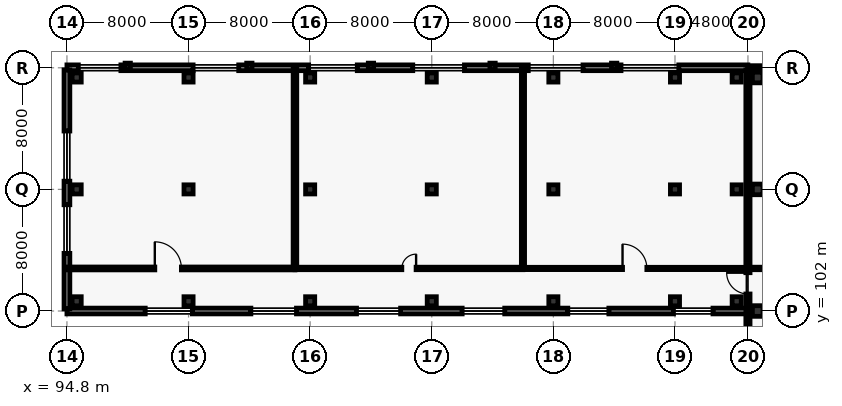
"""IFC4 building model, lengths in metres.
Left out: names, types, materials, properties, quantities, classifications, styles, units other than length and angle.
Written with IfcOpenShell. Run it as: python <this file> out.ifc"""

import sys

from ifc_helpers import new_model, si_unit, direction, frame, frame_2d, origin, origin_2d, place, context, subcontext, project, spatial, rectangle, extrude, element, fill, save


model = new_model("IFC4")
c1 = context("Model", 3, precision=1e-05, world=origin(), true_north=direction((0.0, 1.0)))
c2 = subcontext(c1, "Body", "Model", "MODEL_VIEW")
j1 = project(units=[si_unit("LENGTHUNIT", "METRE"), si_unit("PLANEANGLEUNIT", "RADIAN")], contexts=[c1])
p1 = place(None, origin())
s1 = spatial("IfcSite", under=j1, at=p1, CompositionType="ELEMENT")
p2 = place(p1, origin())
s2 = spatial("IfcBuilding", under=s1, at=p2, CompositionType="ELEMENT")
p3 = place(p2, frame((0.0, 0.0, 5.4)))
s3 = spatial("IfcBuildingStorey", under=s2, at=p3, CompositionType="ELEMENT", Elevation=5.4)
for number, where, z_axis, x_axis in (
    (1, (95.44, 102.64, 0.0), (0.0, 0.0, 1.0), (1.0, 0.0, 0.0)),
    (2, (95.44, 110.0, 0.0), (0.0, 0.0, 1.0), (1.0, 0.0, 0.0)),
    (3, (95.44, 117.36, 0.0), (0.0, 0.0, 1.0), (1.0, 0.0, 0.0)),
    (4, (102.8, 102.64, 0.0), (0.0, 0.0, 1.0), (1.0, 0.0, 0.0)),
    (5, (102.8, 110.0, 0.0), (0.0, 0.0, 1.0), (1.0, 0.0, 0.0)),
    (6, (102.8, 117.36, 0.0), (0.0, 0.0, 1.0), (1.0, 0.0, 0.0)),
    (7, (110.8, 102.64, 0.0), (0.0, 0.0, 1.0), (1.0, 0.0, 0.0)),
    (8, (110.8, 110.0, 0.0), (0.0, 0.0, 1.0), (1.0, 0.0, 0.0)),
    (9, (110.8, 117.36, 0.0), (0.0, 0.0, 1.0), (1.0, 0.0, 0.0)),
    (10, (118.8, 102.64, 0.0), (0.0, 0.0, 1.0), (1.0, 0.0, 0.0)),
    (11, (118.8, 110.0, 0.0), (0.0, 0.0, 1.0), (1.0, 0.0, 0.0)),
    (12, (118.8, 117.36, 0.0), (0.0, 0.0, 1.0), (1.0, 0.0, 0.0)),
    (13, (126.8, 102.64, 0.0), (0.0, 0.0, 1.0), (1.0, 0.0, 0.0)),
    (14, (126.8, 110.0, 0.0), (0.0, 0.0, 1.0), (1.0, 0.0, 0.0)),
    (15, (126.8, 117.36, 0.0), (0.0, 0.0, 1.0), (1.0, 0.0, 0.0)),
    (16, (134.8, 102.64, 0.0), (0.0, 0.0, 1.0), (1.0, 0.0, 0.0)),
    (17, (134.8, 110.0, 0.0), (0.0, 0.0, 1.0), (1.0, 0.0, 0.0)),
    (18, (134.8, 117.36, 0.0), (0.0, 0.0, 1.0), (1.0, 0.0, 0.0)),
    (19, (138.86, 102.64, 0.0), (0.0, 0.0, 1.0), (1.0, 0.0, 0.0)),
    (20, (138.86, 110.0, 0.0), (0.0, 0.0, 1.0), (1.0, 0.0, 0.0)),
    (21, (138.86, 117.36, 0.0), (0.0, 0.0, 1.0), (1.0, 0.0, 0.0)),
):
    element("IfcColumn", number, at=place(p3, frame(where, z_axis=z_axis, x_axis=x_axis)), inside=s3, PredefinedType="COLUMN", context=c2, shape_type="SweptSolid", body=[
        extrude(rectangle(XDim=0.6, YDim=0.6, at=origin_2d()), origin(), (0.0, 0.0, 1.0), 4.8),
    ])
for number, where, z_axis, x_axis in (
    (22, (140.24, 102.0, 0.0), (0.0, 0.0, 1.0), (1.0, 0.0, 0.0)),
    (23, (140.24, 110.0, 0.0), (0.0, 0.0, 1.0), (1.0, 0.0, 0.0)),
    (24, (140.24, 117.36, 0.0), (0.0, 0.0, 1.0), (1.0, 0.0, 0.0)),
):
    element("IfcColumn", number, at=place(p3, frame(where, z_axis=z_axis, x_axis=x_axis)), inside=s3, PredefinedType="COLUMN", context=c2, shape_type="SweptSolid", body=[
        extrude(rectangle(XDim=0.7, YDim=0.7, at=origin_2d()), origin(), (0.0, 0.0, 1.0), 4.8),
    ])
for number, where, z_axis, x_axis in (
    (25, (98.8, 118.08, 0.0), (0.0, 0.0, 1.0), (0.0, 1.0, 0.0)),
    (26, (106.8, 118.08, 0.0), (0.0, 0.0, 1.0), (0.0, 1.0, 0.0)),
    (27, (114.8, 118.08, 0.0), (0.0, 0.0, 1.0), (0.0, 1.0, 0.0)),
    (28, (122.8, 118.08, 0.0), (0.0, 0.0, 1.0), (0.0, 1.0, 0.0)),
    (29, (130.8, 118.08, 0.0), (0.0, 0.0, 1.0), (0.0, 1.0, 0.0)),
):
    element("IfcColumn", number, at=place(p3, frame(where, z_axis=z_axis, x_axis=x_axis)), inside=s3, PredefinedType="PILASTER", context=c2, shape_type="SweptSolid", body=[
        extrude(rectangle(XDim=0.35, YDim=0.45, at=origin_2d()), origin(), (0.0, 0.0, 1.0), 4.8),
    ])
p4 = place(p3, frame((94.8, 118.0, 0.0), z_axis=(0.0, 0.0, 1.0), x_axis=(1.0, 0.0, 0.0)))
e30 = element("IfcWall", 30, at=p4, inside=s3, PredefinedType="SOLIDWALL", context=c2, shape_type="SweptSolid", body=[
    extrude(rectangle(XDim=44.795, YDim=0.38, at=frame_2d((22.397, 0.0))), origin(), (0.0, 0.0, 1.0), 4.54),
])
p5 = place(p4, frame((0.75, 0.0, 0.9)))
e31 = element("IfcOpeningElement", 31, at=p5, cuts=e30, PredefinedType="OPENING", context=c2, shape_type="SweptSolid", body=[
    extrude(rectangle(XDim=2.8, YDim=1.8, at=frame_2d((1.4, 0.9))), frame((0.0, 0.2, 0.0), z_axis=(0.0, -1.0, 0.0), x_axis=(1.0, 0.0, 0.0)), (0.0, 0.0, 1.0), 0.4),
])
p6 = place(p4, frame((8.3, 0.0, 0.9)))
e32 = element("IfcOpeningElement", 32, at=p6, cuts=e30, PredefinedType="OPENING", context=c2, shape_type="SweptSolid", body=[
    extrude(rectangle(XDim=3.0, YDim=1.8, at=frame_2d((1.5, 0.9))), frame((0.0, 0.2, 0.0), z_axis=(0.0, -1.0, 0.0), x_axis=(1.0, 0.0, 0.0)), (0.0, 0.0, 1.0), 0.4),
])
p7 = place(p4, frame((15.9, 0.0, 0.9)))
e33 = element("IfcOpeningElement", 33, at=p7, cuts=e30, PredefinedType="OPENING", context=c2, shape_type="SweptSolid", body=[
    extrude(rectangle(XDim=3.2, YDim=1.85, at=frame_2d((1.6, 0.925))), frame((0.0, 0.2, 0.0), z_axis=(0.0, -1.0, 0.0), x_axis=(1.0, 0.0, 0.0)), (0.0, 0.0, 1.0), 0.4),
])
p8 = place(p4, frame((22.75, 0.0, 0.9)))
e34 = element("IfcOpeningElement", 34, at=p8, cuts=e30, PredefinedType="OPENING", context=c2, shape_type="SweptSolid", body=[
    extrude(rectangle(XDim=3.4, YDim=1.85, at=frame_2d((1.7, 0.925))), frame((0.0, 0.2, 0.0), z_axis=(0.0, -1.0, 0.0), x_axis=(1.0, 0.0, 0.0)), (0.0, 0.0, 1.0), 0.4),
])
p9 = place(p4, frame((30.35, 0.0, 0.9)))
e35 = element("IfcOpeningElement", 35, at=p9, cuts=e30, PredefinedType="OPENING", context=c2, shape_type="SweptSolid", body=[
    extrude(rectangle(XDim=3.6, YDim=1.9, at=frame_2d((1.8, 0.95))), frame((0.0, 0.2, 0.0), z_axis=(0.0, -1.0, 0.0), x_axis=(1.0, 0.0, 0.0)), (0.0, 0.0, 1.0), 0.4),
])
p10 = place(p4, frame((36.45, 0.0, 0.9)))
e36 = element("IfcOpeningElement", 36, at=p10, cuts=e30, PredefinedType="OPENING", context=c2, shape_type="SweptSolid", body=[
    extrude(rectangle(XDim=3.8, YDim=1.9, at=frame_2d((1.9, 0.95))), frame((0.0, 0.2, 0.0), z_axis=(0.0, -1.0, 0.0), x_axis=(1.0, 0.0, 0.0)), (0.0, 0.0, 1.0), 0.4),
])
p11 = place(p3, frame((139.5, 102.0, 0.0), z_axis=(0.0, 0.0, 1.0), x_axis=(-1.0, 0.0, 0.0)))
e37 = element("IfcWall", 37, at=p11, inside=s3, PredefinedType="SOLIDWALL", context=c2, shape_type="SweptSolid", body=[
    extrude(rectangle(XDim=44.7, YDim=0.38, at=frame_2d((22.35, 0.0))), origin(), (0.0, 0.0, 1.0), 4.54),
])
p12 = place(p11, frame((2.2, 0.0, 0.9)))
e38 = element("IfcOpeningElement", 38, at=p12, cuts=e37, PredefinedType="OPENING", context=c2, shape_type="SweptSolid", body=[
    extrude(rectangle(XDim=2.6, YDim=2.35, at=frame_2d((1.3, 1.175))), frame((0.0, 0.2, 0.0), z_axis=(0.0, -1.0, 0.0), x_axis=(1.0, 0.0, 0.0)), (0.0, 0.0, 1.0), 0.4),
])
p13 = place(p11, frame((9.05, 0.0, 0.9)))
e39 = element("IfcOpeningElement", 39, at=p13, cuts=e37, PredefinedType="OPENING", context=c2, shape_type="SweptSolid", body=[
    extrude(rectangle(XDim=2.7, YDim=2.35, at=frame_2d((1.35, 1.175))), frame((0.0, 0.2, 0.0), z_axis=(0.0, -1.0, 0.0), x_axis=(1.0, 0.0, 0.0)), (0.0, 0.0, 1.0), 0.4),
])
p14 = place(p11, frame((15.9, 0.0, 0.9)))
e40 = element("IfcOpeningElement", 40, at=p14, cuts=e37, PredefinedType="OPENING", context=c2, shape_type="SweptSolid", body=[
    extrude(rectangle(XDim=2.8, YDim=2.4, at=frame_2d((1.4, 1.2))), frame((0.0, 0.2, 0.0), z_axis=(0.0, -1.0, 0.0), x_axis=(1.0, 0.0, 0.0)), (0.0, 0.0, 1.0), 0.4),
])
p15 = place(p11, frame((22.75, 0.0, 0.9)))
e41 = element("IfcOpeningElement", 41, at=p15, cuts=e37, PredefinedType="OPENING", context=c2, shape_type="SweptSolid", body=[
    extrude(rectangle(XDim=2.9, YDim=2.4, at=frame_2d((1.45, 1.2))), frame((0.0, 0.2, 0.0), z_axis=(0.0, -1.0, 0.0), x_axis=(1.0, 0.0, 0.0)), (0.0, 0.0, 1.0), 0.4),
])
p16 = place(p11, frame((29.6, 0.0, 0.9)))
e42 = element("IfcOpeningElement", 42, at=p16, cuts=e37, PredefinedType="OPENING", context=c2, shape_type="SweptSolid", body=[
    extrude(rectangle(XDim=3.0, YDim=2.45, at=frame_2d((1.5, 1.225))), frame((0.0, 0.2, 0.0), z_axis=(0.0, -1.0, 0.0), x_axis=(1.0, 0.0, 0.0)), (0.0, 0.0, 1.0), 0.4),
])
p17 = place(p11, frame((36.45, 0.0, 0.9)))
e43 = element("IfcOpeningElement", 43, at=p17, cuts=e37, PredefinedType="OPENING", context=c2, shape_type="SweptSolid", body=[
    extrude(rectangle(XDim=3.1, YDim=2.45, at=frame_2d((1.55, 1.225))), frame((0.0, 0.2, 0.0), z_axis=(0.0, -1.0, 0.0), x_axis=(1.0, 0.0, 0.0)), (0.0, 0.0, 1.0), 0.4),
])
p18 = place(p3, frame((94.8, 102.14, 0.0), z_axis=(0.0, 0.0, 1.0), x_axis=(0.0, 1.0, 0.0)))
e44 = element("IfcWall", 44, at=p18, inside=s3, PredefinedType="SOLIDWALL", context=c2, shape_type="SweptSolid", body=[
    extrude(rectangle(XDim=15.72, YDim=0.38, at=frame_2d((7.86, 0.0))), origin(), (0.0, 0.0, 1.0), 4.54),
])
p19 = place(p18, frame((3.65, 0.0, 0.9)))
e45 = element("IfcOpeningElement", 45, at=p19, cuts=e44, PredefinedType="OPENING", context=c2, shape_type="SweptSolid", body=[
    extrude(rectangle(XDim=3.2, YDim=2.5, at=frame_2d((1.6, 1.25))), frame((0.0, 0.2, 0.0), z_axis=(0.0, -1.0, 0.0), x_axis=(1.0, 0.0, 0.0)), (0.0, 0.0, 1.0), 0.4),
])
p20 = place(p18, frame((8.4, 0.0, 0.9)))
e46 = element("IfcOpeningElement", 46, at=p20, cuts=e44, PredefinedType="OPENING", context=c2, shape_type="SweptSolid", body=[
    extrude(rectangle(XDim=3.3, YDim=2.5, at=frame_2d((1.65, 1.25))), frame((0.0, 0.2, 0.0), z_axis=(0.0, -1.0, 0.0), x_axis=(1.0, 0.0, 0.0)), (0.0, 0.0, 1.0), 0.4),
])
p21 = place(p3, frame((139.6, 118.0, 0.0), z_axis=(0.0, 0.0, 1.0), x_axis=(1.0, 0.0, 0.0)))
e47 = element("IfcWall", 47, at=p21, inside=s3, PredefinedType="SOLIDWALL", context=c2, shape_type="SweptSolid", body=[
    extrude(rectangle(XDim=32.4, YDim=0.275, at=frame_2d((16.2, 0.0))), origin(), (0.0, 0.0, 1.0), 4.55),
])
p22 = place(p21, frame((2.2, 0.0, 0.9)))
e48 = element("IfcOpeningElement", 48, at=p22, cuts=e47, PredefinedType="OPENING", context=c2, shape_type="SweptSolid", body=[
    extrude(rectangle(XDim=3.4, YDim=1.85, at=frame_2d((1.7, 0.925))), frame((0.0, 0.147, 0.0), z_axis=(0.0, -1.0, 0.0), x_axis=(1.0, 0.0, 0.0)), (0.0, 0.0, 1.0), 0.295),
])
p23 = place(p21, frame((7.96, 0.0, 0.9)))
e49 = element("IfcOpeningElement", 49, at=p23, cuts=e47, PredefinedType="OPENING", context=c2, shape_type="SweptSolid", body=[
    extrude(rectangle(XDim=3.6, YDim=1.9, at=frame_2d((1.8, 0.95))), frame((0.0, 0.147, 0.0), z_axis=(0.0, -1.0, 0.0), x_axis=(1.0, 0.0, 0.0)), (0.0, 0.0, 1.0), 0.295),
])
p24 = place(p21, frame((13.72, 0.0, 0.9)))
e50 = element("IfcOpeningElement", 50, at=p24, cuts=e47, PredefinedType="OPENING", context=c2, shape_type="SweptSolid", body=[
    extrude(rectangle(XDim=1.6, YDim=1.65, at=frame_2d((0.8, 0.825))), frame((0.0, 0.147, 0.0), z_axis=(0.0, -1.0, 0.0), x_axis=(1.0, 0.0, 0.0)), (0.0, 0.0, 1.0), 0.295),
])
p25 = place(p21, frame((18.73, 0.0, 0.9)))
e51 = element("IfcOpeningElement", 51, at=p25, cuts=e47, PredefinedType="OPENING", context=c2, shape_type="SweptSolid", body=[
    extrude(rectangle(XDim=2.6, YDim=2.35, at=frame_2d((1.3, 1.175))), frame((0.0, 0.147, 0.0), z_axis=(0.0, -1.0, 0.0), x_axis=(1.0, 0.0, 0.0)), (0.0, 0.0, 1.0), 0.295),
])
p26 = place(p3, frame((139.6, 71.74, 0.0), z_axis=(0.0, 0.0, 1.0), x_axis=(0.0, 1.0, 0.0)))
e52 = element("IfcWall", 52, at=p26, inside=s3, PredefinedType="SOLIDWALL", context=c2, shape_type="SweptSolid", body=[
    extrude(rectangle(XDim=46.12, YDim=0.275, at=frame_2d((23.06, 0.0))), origin(), (0.0, 0.0, 1.0), 3.69),
])
p27 = place(p26, frame((31.38, 0.0, 0.0)))
e53 = element("IfcOpeningElement", 53, at=p27, cuts=e52, PredefinedType="OPENING", context=c2, shape_type="SweptSolid", body=[
    extrude(rectangle(XDim=1.4, YDim=2.25, at=frame_2d((0.7, 1.125))), frame((0.0, 0.147, 0.0), z_axis=(0.0, -1.0, 0.0), x_axis=(1.0, 0.0, 0.0)), (0.0, 0.0, 1.0), 0.295),
])
p28 = place(p3, frame((94.8, 104.8, 0.0), z_axis=(0.0, 0.0, 1.0), x_axis=(1.0, 0.0, 0.0)))
e54 = element("IfcWall", 54, at=p28, inside=s3, PredefinedType="PARTITIONING", context=c2, shape_type="SweptSolid", body=[
    extrude(rectangle(XDim=15.0, YDim=0.19, at=frame_2d((7.5, 0.0))), origin(), (0.0, 0.0, 1.0), 4.54),
])
p29 = place(p28, frame((5.78, 0.0, 0.0)))
e55 = element("IfcOpeningElement", 55, at=p29, cuts=e54, PredefinedType="OPENING", context=c2, shape_type="SweptSolid", body=[
    extrude(rectangle(XDim=1.75, YDim=2.35, at=frame_2d((0.875, 1.175))), frame((0.0, 0.105, 0.0), z_axis=(0.0, -1.0, 0.0), x_axis=(1.0, 0.0, 0.0)), (0.0, 0.0, 1.0), 0.21),
])
p30 = place(p3, frame((109.8, 104.8, 0.0), z_axis=(0.0, 0.0, 1.0), x_axis=(1.0, 0.0, 0.0)))
e56 = element("IfcWall", 56, at=p30, inside=s3, PredefinedType="PARTITIONING", context=c2, shape_type="SweptSolid", body=[
    extrude(rectangle(XDim=15.0, YDim=0.165, at=frame_2d((7.5, 0.0))), origin(), (0.0, 0.0, 1.0), 4.54),
])
p31 = place(p30, frame((7.03, 0.0, 0.0)))
e57 = element("IfcOpeningElement", 57, at=p31, cuts=e56, PredefinedType="OPENING", context=c2, shape_type="SweptSolid", body=[
    extrude(rectangle(XDim=0.94, YDim=2.15, at=frame_2d((0.47, 1.075))), frame((0.0, 0.093, 0.0), z_axis=(0.0, -1.0, 0.0), x_axis=(1.0, 0.0, 0.0)), (0.0, 0.0, 1.0), 0.185),
])
p32 = place(p3, frame((124.8, 104.8, 0.0), z_axis=(0.0, 0.0, 1.0), x_axis=(1.0, 0.0, 0.0)))
e58 = element("IfcWall", 58, at=p32, inside=s3, PredefinedType="PARTITIONING", context=c2, shape_type="SweptSolid", body=[
    extrude(rectangle(XDim=14.7, YDim=0.15, at=frame_2d((7.35, 0.0))), origin(), (0.0, 0.0, 1.0), 4.54),
])
p33 = place(p32, frame((6.55, 0.0, 0.0)))
e59 = element("IfcOpeningElement", 59, at=p33, cuts=e58, PredefinedType="OPENING", context=c2, shape_type="SweptSolid", body=[
    extrude(rectangle(XDim=1.6, YDim=2.3, at=frame_2d((0.8, 1.15))), frame((0.0, 0.085, 0.0), z_axis=(0.0, -1.0, 0.0), x_axis=(1.0, 0.0, 0.0)), (0.0, 0.0, 1.0), 0.17),
])
p34 = place(p3, frame((109.8, 118.0, 0.0), z_axis=(0.0, 0.0, 1.0), x_axis=(0.0, -1.0, 0.0)))
e60 = element("IfcWall", 60, at=p34, inside=s3, PredefinedType="PARTITIONING", context=c2, shape_type="SweptSolid", body=[
    extrude(rectangle(XDim=13.2, YDim=0.24, at=frame_2d((6.6, 0.0))), origin(), (0.0, 0.0, 1.0), 4.54),
])
p35 = place(p3, frame((124.8, 118.0, 0.0), z_axis=(0.0, 0.0, 1.0), x_axis=(0.0, -1.0, 0.0)))
e61 = element("IfcWall", 61, at=p35, inside=s3, PredefinedType="PARTITIONING", context=c2, shape_type="SweptSolid", body=[
    extrude(rectangle(XDim=13.2, YDim=0.21, at=frame_2d((6.6, 0.0))), origin(), (0.0, 0.0, 1.0), 4.54),
])
p36 = place(p3, frame((157.4, 102.0, 0.0), z_axis=(0.0, 0.0, 1.0), x_axis=(-1.0, 0.0, 0.0)))
e62 = element("IfcWall", 62, at=p36, inside=s3, PredefinedType="PARTITIONING", context=c2, shape_type="SweptSolid", body=[
    extrude(rectangle(XDim=17.8, YDim=0.19, at=frame_2d((8.9, 0.0))), origin(), (0.0, 0.0, 1.0), 3.9),
])
p37 = place(p3, frame((139.6, 104.8, 0.0), z_axis=(0.0, 0.0, 1.0), x_axis=(1.0, 0.0, 0.0)))
e63 = element("IfcWall", 63, at=p37, inside=s3, PredefinedType="PARTITIONING", context=c2, shape_type="SweptSolid", body=[
    extrude(rectangle(XDim=17.8, YDim=0.165, at=frame_2d((8.9, 0.0))), origin(), (0.0, 0.0, 1.0), 4.55),
])
p38 = place(p37, frame((8.425, 0.0, 0.0)))
e64 = element("IfcOpeningElement", 64, at=p38, cuts=e63, PredefinedType="OPENING", context=c2, shape_type="SweptSolid", body=[
    extrude(rectangle(XDim=0.95, YDim=2.1, at=frame_2d((0.475, 1.05))), frame((0.0, 0.093, 0.0), z_axis=(0.0, -1.0, 0.0), x_axis=(1.0, 0.0, 0.0)), (0.0, 0.0, 1.0), 0.185),
])
p39 = place(p37, frame((13.409, 0.0, 0.0)))
e65 = element("IfcOpeningElement", 65, at=p39, cuts=e63, PredefinedType="OPENING", context=c2, shape_type="SweptSolid", body=[
    extrude(rectangle(XDim=0.95, YDim=2.1, at=frame_2d((0.475, 1.05))), frame((0.0, 0.093, 0.0), z_axis=(0.0, -1.0, 0.0), x_axis=(1.0, 0.0, 0.0)), (0.0, 0.0, 1.0), 0.185),
])
p40 = place(p5, origin())
e66 = element("IfcWindow", 66, at=p40, inside=s3, PartitioningType="SINGLE_PANEL", PredefinedType="WINDOW", context=c2, shape_type="SweptSolid", body=[
    extrude(rectangle(XDim=2.8, YDim=1.8, at=frame_2d((1.4, 0.9))), frame((0.0, 0.03, 0.0), z_axis=(0.0, -1.0, 0.0), x_axis=(1.0, 0.0, 0.0)), (0.0, 0.0, 1.0), 0.06),
])
fill(e31, e66)
p41 = place(p6, origin())
e67 = element("IfcWindow", 67, at=p41, inside=s3, PartitioningType="SINGLE_PANEL", PredefinedType="WINDOW", context=c2, shape_type="SweptSolid", body=[
    extrude(rectangle(XDim=3.0, YDim=1.8, at=frame_2d((1.5, 0.9))), frame((0.0, 0.03, 0.0), z_axis=(0.0, -1.0, 0.0), x_axis=(1.0, 0.0, 0.0)), (0.0, 0.0, 1.0), 0.06),
])
fill(e32, e67)
p42 = place(p7, origin())
e68 = element("IfcWindow", 68, at=p42, inside=s3, PartitioningType="SINGLE_PANEL", PredefinedType="WINDOW", context=c2, shape_type="SweptSolid", body=[
    extrude(rectangle(XDim=3.2, YDim=1.85, at=frame_2d((1.6, 0.925))), frame((0.0, 0.03, 0.0), z_axis=(0.0, -1.0, 0.0), x_axis=(1.0, 0.0, 0.0)), (0.0, 0.0, 1.0), 0.06),
])
fill(e33, e68)
p43 = place(p8, origin())
e69 = element("IfcWindow", 69, at=p43, inside=s3, PartitioningType="SINGLE_PANEL", PredefinedType="WINDOW", context=c2, shape_type="SweptSolid", body=[
    extrude(rectangle(XDim=3.4, YDim=1.85, at=frame_2d((1.7, 0.925))), frame((0.0, 0.03, 0.0), z_axis=(0.0, -1.0, 0.0), x_axis=(1.0, 0.0, 0.0)), (0.0, 0.0, 1.0), 0.06),
])
fill(e34, e69)
p44 = place(p9, origin())
e70 = element("IfcWindow", 70, at=p44, inside=s3, PartitioningType="SINGLE_PANEL", PredefinedType="WINDOW", context=c2, shape_type="SweptSolid", body=[
    extrude(rectangle(XDim=3.6, YDim=1.9, at=frame_2d((1.8, 0.95))), frame((0.0, 0.03, 0.0), z_axis=(0.0, -1.0, 0.0), x_axis=(1.0, 0.0, 0.0)), (0.0, 0.0, 1.0), 0.06),
])
fill(e35, e70)
p45 = place(p10, origin())
e71 = element("IfcWindow", 71, at=p45, inside=s3, PartitioningType="SINGLE_PANEL", PredefinedType="WINDOW", context=c2, shape_type="SweptSolid", body=[
    extrude(rectangle(XDim=3.8, YDim=1.9, at=frame_2d((1.9, 0.95))), frame((0.0, 0.03, 0.0), z_axis=(0.0, -1.0, 0.0), x_axis=(1.0, 0.0, 0.0)), (0.0, 0.0, 1.0), 0.06),
])
fill(e36, e71)
p46 = place(p12, origin())
e72 = element("IfcWindow", 72, at=p46, inside=s3, PartitioningType="SINGLE_PANEL", PredefinedType="WINDOW", context=c2, shape_type="SweptSolid", body=[
    extrude(rectangle(XDim=2.6, YDim=2.35, at=frame_2d((1.3, 1.175))), frame((0.0, 0.03, 0.0), z_axis=(0.0, -1.0, 0.0), x_axis=(1.0, 0.0, 0.0)), (0.0, 0.0, 1.0), 0.06),
])
fill(e38, e72)
p47 = place(p13, origin())
e73 = element("IfcWindow", 73, at=p47, inside=s3, PartitioningType="SINGLE_PANEL", PredefinedType="WINDOW", context=c2, shape_type="SweptSolid", body=[
    extrude(rectangle(XDim=2.7, YDim=2.35, at=frame_2d((1.35, 1.175))), frame((0.0, 0.03, 0.0), z_axis=(0.0, -1.0, 0.0), x_axis=(1.0, 0.0, 0.0)), (0.0, 0.0, 1.0), 0.06),
])
fill(e39, e73)
p48 = place(p14, origin())
e74 = element("IfcWindow", 74, at=p48, inside=s3, PartitioningType="SINGLE_PANEL", PredefinedType="WINDOW", context=c2, shape_type="SweptSolid", body=[
    extrude(rectangle(XDim=2.8, YDim=2.4, at=frame_2d((1.4, 1.2))), frame((0.0, 0.03, 0.0), z_axis=(0.0, -1.0, 0.0), x_axis=(1.0, 0.0, 0.0)), (0.0, 0.0, 1.0), 0.06),
])
fill(e40, e74)
p49 = place(p15, origin())
e75 = element("IfcWindow", 75, at=p49, inside=s3, PartitioningType="SINGLE_PANEL", PredefinedType="WINDOW", context=c2, shape_type="SweptSolid", body=[
    extrude(rectangle(XDim=2.9, YDim=2.4, at=frame_2d((1.45, 1.2))), frame((0.0, 0.03, 0.0), z_axis=(0.0, -1.0, 0.0), x_axis=(1.0, 0.0, 0.0)), (0.0, 0.0, 1.0), 0.06),
])
fill(e41, e75)
p50 = place(p16, origin())
e76 = element("IfcWindow", 76, at=p50, inside=s3, PartitioningType="SINGLE_PANEL", PredefinedType="WINDOW", context=c2, shape_type="SweptSolid", body=[
    extrude(rectangle(XDim=3.0, YDim=2.45, at=frame_2d((1.5, 1.225))), frame((0.0, 0.03, 0.0), z_axis=(0.0, -1.0, 0.0), x_axis=(1.0, 0.0, 0.0)), (0.0, 0.0, 1.0), 0.06),
])
fill(e42, e76)
p51 = place(p17, origin())
e77 = element("IfcWindow", 77, at=p51, inside=s3, PartitioningType="SINGLE_PANEL", PredefinedType="WINDOW", context=c2, shape_type="SweptSolid", body=[
    extrude(rectangle(XDim=3.1, YDim=2.45, at=frame_2d((1.55, 1.225))), frame((0.0, 0.03, 0.0), z_axis=(0.0, -1.0, 0.0), x_axis=(1.0, 0.0, 0.0)), (0.0, 0.0, 1.0), 0.06),
])
fill(e43, e77)
p52 = place(p19, origin())
e78 = element("IfcWindow", 78, at=p52, inside=s3, PartitioningType="SINGLE_PANEL", PredefinedType="WINDOW", context=c2, shape_type="SweptSolid", body=[
    extrude(rectangle(XDim=3.2, YDim=2.5, at=frame_2d((1.6, 1.25))), frame((0.0, 0.03, 0.0), z_axis=(0.0, -1.0, 0.0), x_axis=(1.0, 0.0, 0.0)), (0.0, 0.0, 1.0), 0.06),
])
fill(e45, e78)
p53 = place(p20, origin())
e79 = element("IfcWindow", 79, at=p53, inside=s3, PartitioningType="SINGLE_PANEL", PredefinedType="WINDOW", context=c2, shape_type="SweptSolid", body=[
    extrude(rectangle(XDim=3.3, YDim=2.5, at=frame_2d((1.65, 1.25))), frame((0.0, 0.03, 0.0), z_axis=(0.0, -1.0, 0.0), x_axis=(1.0, 0.0, 0.0)), (0.0, 0.0, 1.0), 0.06),
])
fill(e46, e79)
p54 = place(p27, origin())
e80 = element("IfcDoor", 80, at=p54, inside=s3, OperationType="SINGLE_SWING_RIGHT", PredefinedType="DOOR", context=c2, shape_type="SweptSolid", body=[
    extrude(rectangle(XDim=1.4, YDim=2.25, at=frame_2d((0.7, 1.125))), frame((0.0, 0.025, 0.0), z_axis=(0.0, -1.0, 0.0), x_axis=(1.0, 0.0, 0.0)), (0.0, 0.0, 1.0), 0.05),
])
fill(e53, e80)
p55 = place(p29, origin())
e81 = element("IfcDoor", 81, at=p55, inside=s3, OperationType="SINGLE_SWING_LEFT", PredefinedType="DOOR", context=c2, shape_type="SweptSolid", body=[
    extrude(rectangle(XDim=1.75, YDim=2.35, at=frame_2d((0.875, 1.175))), frame((0.0, 0.025, 0.0), z_axis=(0.0, -1.0, 0.0), x_axis=(1.0, 0.0, 0.0)), (0.0, 0.0, 1.0), 0.05),
])
fill(e55, e81)
p56 = place(p31, origin())
e82 = element("IfcDoor", 82, at=p56, inside=s3, OperationType="SINGLE_SWING_RIGHT", PredefinedType="DOOR", context=c2, shape_type="SweptSolid", body=[
    extrude(rectangle(XDim=0.94, YDim=2.15, at=frame_2d((0.47, 1.075))), frame((0.0, 0.025, 0.0), z_axis=(0.0, -1.0, 0.0), x_axis=(1.0, 0.0, 0.0)), (0.0, 0.0, 1.0), 0.05),
])
fill(e57, e82)
p57 = place(p33, origin())
e83 = element("IfcDoor", 83, at=p57, inside=s3, OperationType="SINGLE_SWING_LEFT", PredefinedType="DOOR", context=c2, shape_type="SweptSolid", body=[
    extrude(rectangle(XDim=1.6, YDim=2.3, at=frame_2d((0.8, 1.15))), frame((0.0, 0.025, 0.0), z_axis=(0.0, -1.0, 0.0), x_axis=(1.0, 0.0, 0.0)), (0.0, 0.0, 1.0), 0.05),
])
fill(e59, e83)
save(model, sys.argv[1])
